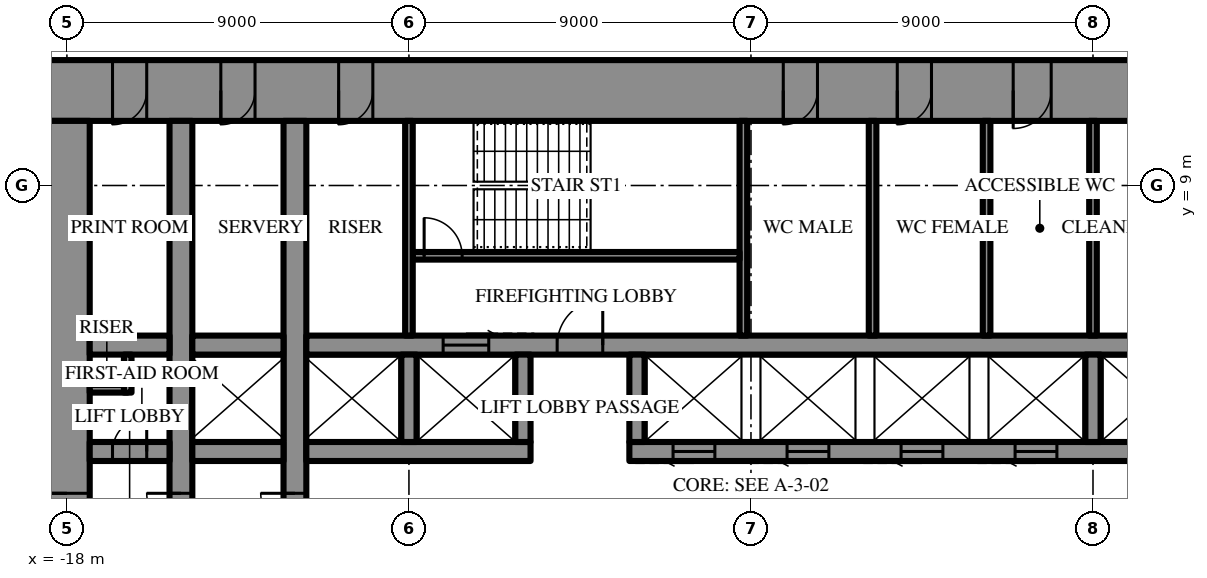
"""IFC4 building model, lengths in metres.
Left out: names, types, materials, properties, quantities, classifications, styles, units other than length and angle.
Written with IfcOpenShell. Run it as: python <this file> out.ifc"""

import sys

from ifc_helpers import new_model, si_unit, direction, frame, frame_2d, origin, place, context, subcontext, project, spatial, rectangle, extrude, element, fill, save


model = new_model("IFC4")
c1 = context("Model", 3, precision=1e-05, world=origin(), true_north=direction((0.0, 1.0)))
c2 = subcontext(c1, "Body", "Model", "MODEL_VIEW")
j1 = project(units=[si_unit("LENGTHUNIT", "METRE"), si_unit("PLANEANGLEUNIT", "RADIAN")], contexts=[c1])
p1 = place(None, origin())
s1 = spatial("IfcSite", under=j1, at=p1, CompositionType="ELEMENT")
p2 = place(p1, origin())
s2 = spatial("IfcBuilding", under=s1, at=p2, CompositionType="ELEMENT")
p3 = place(p2, frame((0.0, 0.0, 148.9)))
s3 = spatial("IfcBuildingStorey", under=s2, at=p3, CompositionType="ELEMENT", Elevation=148.9)
p4 = place(p3, frame((-18.6, 11.5, 0.0), z_axis=(0.0, 0.0, 1.0), x_axis=(1.0, 0.0, 0.0)))
e1 = element("IfcWall", 1, at=p4, inside=s3, PredefinedType="SHEAR", context=c2, shape_type="SweptSolid", body=[
    extrude(rectangle(XDim=37.2, YDim=1.6, at=frame_2d((18.6, 0.0))), origin(), (0.0, 0.0, 1.0), 4.2),
])
p5 = place(p4, frame((19.45, 0.0, 0.0)))
e2 = element("IfcOpeningElement", 2, at=p5, cuts=e1, PredefinedType="OPENING", context=c2, shape_type="SweptSolid", body=[
    extrude(rectangle(XDim=0.9, YDim=2.2, at=frame_2d((0.45, 1.1))), frame((0.0, 0.81, 0.0), z_axis=(0.0, -1.0, 0.0), x_axis=(1.0, 0.0, 0.0)), (0.0, 0.0, 1.0), 1.62),
])
p6 = place(p4, frame((22.45, 0.0, 0.0)))
e3 = element("IfcOpeningElement", 3, at=p6, cuts=e1, PredefinedType="OPENING", context=c2, shape_type="SweptSolid", body=[
    extrude(rectangle(XDim=0.9, YDim=2.2, at=frame_2d((0.45, 1.1))), frame((0.0, 0.81, 0.0), z_axis=(0.0, -1.0, 0.0), x_axis=(1.0, 0.0, 0.0)), (0.0, 0.0, 1.0), 1.62),
])
p7 = place(p4, frame((25.5, 0.0, 0.0)))
e4 = element("IfcOpeningElement", 4, at=p7, cuts=e1, PredefinedType="OPENING", context=c2, shape_type="SweptSolid", body=[
    extrude(rectangle(XDim=1.0, YDim=2.2, at=frame_2d((0.5, 1.1))), frame((0.0, 0.81, 0.0), z_axis=(0.0, -1.0, 0.0), x_axis=(1.0, 0.0, 0.0)), (0.0, 0.0, 1.0), 1.62),
])
p8 = place(p4, frame((1.8, 0.0, 0.0)))
e5 = element("IfcOpeningElement", 5, at=p8, cuts=e1, PredefinedType="OPENING", context=c2, shape_type="SweptSolid", body=[
    extrude(rectangle(XDim=0.9, YDim=2.2, at=frame_2d((0.45, 1.1))), frame((0.0, 0.81, 0.0), z_axis=(0.0, -1.0, 0.0), x_axis=(1.0, 0.0, 0.0)), (0.0, 0.0, 1.0), 1.62),
])
p9 = place(p4, frame((4.65, 0.0, 0.0)))
e6 = element("IfcOpeningElement", 6, at=p9, cuts=e1, PredefinedType="OPENING", context=c2, shape_type="SweptSolid", body=[
    extrude(rectangle(XDim=0.9, YDim=2.2, at=frame_2d((0.45, 1.1))), frame((0.0, 0.81, 0.0), z_axis=(0.0, -1.0, 0.0), x_axis=(1.0, 0.0, 0.0)), (0.0, 0.0, 1.0), 1.62),
])
p10 = place(p4, frame((7.75, 0.0, 0.0)))
e7 = element("IfcOpeningElement", 7, at=p10, cuts=e1, PredefinedType="OPENING", context=c2, shape_type="SweptSolid", body=[
    extrude(rectangle(XDim=0.9, YDim=2.2, at=frame_2d((0.45, 1.1))), frame((0.0, 0.81, 0.0), z_axis=(0.0, -1.0, 0.0), x_axis=(1.0, 0.0, 0.0)), (0.0, 0.0, 1.0), 1.62),
])
p11 = place(p4, frame((28.55, 0.0, 0.0)))
e8 = element("IfcOpeningElement", 8, at=p11, cuts=e1, PredefinedType="OPENING", context=c2, shape_type="SweptSolid", body=[
    extrude(rectangle(XDim=0.9, YDim=2.2, at=frame_2d((0.45, 1.1))), frame((0.0, 0.81, 0.0), z_axis=(0.0, -1.0, 0.0), x_axis=(1.0, 0.0, 0.0)), (0.0, 0.0, 1.0), 1.62),
])
p12 = place(p4, frame((31.65, 0.0, 0.0)))
e9 = element("IfcOpeningElement", 9, at=p12, cuts=e1, PredefinedType="OPENING", context=c2, shape_type="SweptSolid", body=[
    extrude(rectangle(XDim=0.9, YDim=2.2, at=frame_2d((0.45, 1.1))), frame((0.0, 0.81, 0.0), z_axis=(0.0, -1.0, 0.0), x_axis=(1.0, 0.0, 0.0)), (0.0, 0.0, 1.0), 1.62),
])
p13 = place(p4, frame((34.5, 0.0, 0.0)))
e10 = element("IfcOpeningElement", 10, at=p13, cuts=e1, PredefinedType="OPENING", context=c2, shape_type="SweptSolid", body=[
    extrude(rectangle(XDim=0.9, YDim=2.2, at=frame_2d((0.45, 1.1))), frame((0.0, 0.81, 0.0), z_axis=(0.0, -1.0, 0.0), x_axis=(1.0, 0.0, 0.0)), (0.0, 0.0, 1.0), 1.62),
])
p14 = place(p3, frame((-18.0, 10.7, 0.0), z_axis=(0.0, 0.0, 1.0), x_axis=(0.0, -1.0, 0.0)))
e11 = element("IfcWall", 11, at=p14, inside=s3, PredefinedType="SHEAR", context=c2, shape_type="SweptSolid", body=[
    extrude(rectangle(XDim=21.4, YDim=1.2, at=frame_2d((10.7, 0.0))), origin(), (0.0, 0.0, 1.0), 4.2),
])
p15 = place(p14, frame((9.8, 0.0, 0.0)))
e12 = element("IfcOpeningElement", 12, at=p15, cuts=e11, PredefinedType="OPENING", context=c2, shape_type="SweptSolid", body=[
    extrude(rectangle(XDim=1.8, YDim=2.4, at=frame_2d((0.9, 1.2))), frame((0.0, 0.61, 0.0), z_axis=(0.0, -1.0, 0.0), x_axis=(1.0, 0.0, 0.0)), (0.0, 0.0, 1.0), 1.22),
])
p16 = place(p3, frame((-12.0, -10.7, 0.0), z_axis=(0.0, 0.0, 1.0), x_axis=(0.0, 1.0, 0.0)))
e13 = element("IfcWall", 13, at=p16, inside=s3, PredefinedType="SHEAR", context=c2, shape_type="SweptSolid", body=[
    extrude(rectangle(XDim=21.4, YDim=0.6, at=frame_2d((10.7, 0.0))), origin(), (0.0, 0.0, 1.0), 4.2),
])
p17 = place(p16, frame((9.8, 0.0, 0.0)))
e14 = element("IfcOpeningElement", 14, at=p17, cuts=e13, PredefinedType="OPENING", context=c2, shape_type="SweptSolid", body=[
    extrude(rectangle(XDim=1.8, YDim=2.4, at=frame_2d((0.9, 1.2))), frame((0.0, 0.31, 0.0), z_axis=(0.0, -1.0, 0.0), x_axis=(1.0, 0.0, 0.0)), (0.0, 0.0, 1.0), 0.62),
])
p18 = place(p3, frame((-15.0, -10.7, 0.0), z_axis=(0.0, 0.0, 1.0), x_axis=(0.0, 1.0, 0.0)))
e15 = element("IfcWall", 15, at=p18, inside=s3, PredefinedType="SHEAR", context=c2, shape_type="SweptSolid", body=[
    extrude(rectangle(XDim=21.4, YDim=0.6, at=frame_2d((10.7, 0.0))), origin(), (0.0, 0.0, 1.0), 4.2),
])
p19 = place(p18, frame((9.8, 0.0, 0.0)))
e16 = element("IfcOpeningElement", 16, at=p19, cuts=e15, PredefinedType="OPENING", context=c2, shape_type="SweptSolid", body=[
    extrude(rectangle(XDim=1.8, YDim=2.4, at=frame_2d((0.9, 1.2))), frame((0.0, 0.31, 0.0), z_axis=(0.0, -1.0, 0.0), x_axis=(1.0, 0.0, 0.0)), (0.0, 0.0, 1.0), 0.62),
])
p20 = place(p3, frame((-17.4, 2.0, 0.0), z_axis=(0.0, 0.0, 1.0), x_axis=(1.0, 0.0, 0.0)))
e17 = element("IfcWall", 17, at=p20, inside=s3, PredefinedType="SHEAR", context=c2, shape_type="SweptSolid", body=[
    extrude(rectangle(XDim=2.1, YDim=0.5, at=frame_2d((1.05, 0.0))), origin(), (0.0, 0.0, 1.0), 4.2),
])
p21 = place(p20, frame((0.6, 0.0, 0.0)))
e18 = element("IfcOpeningElement", 18, at=p21, cuts=e17, PredefinedType="OPENING", context=c2, shape_type="SweptSolid", body=[
    extrude(rectangle(XDim=0.9, YDim=2.2, at=frame_2d((0.45, 1.1))), frame((0.0, 0.26, 0.0), z_axis=(0.0, -1.0, 0.0), x_axis=(1.0, 0.0, 0.0)), (0.0, 0.0, 1.0), 0.52),
])
p22 = place(p3, frame((-14.7, 2.0, 0.0), z_axis=(0.0, 0.0, 1.0), x_axis=(1.0, 0.0, 0.0)))
e19 = element("IfcWall", 19, at=p22, inside=s3, PredefinedType="SHEAR", context=c2, shape_type="SweptSolid", body=[
    extrude(rectangle(XDim=2.4, YDim=0.5, at=frame_2d((1.2, 0.0))), origin(), (0.0, 0.0, 1.0), 4.2),
])
p23 = place(p3, frame((-11.7, 2.0, 0.0), z_axis=(0.0, 0.0, 1.0), x_axis=(1.0, 0.0, 0.0)))
e20 = element("IfcWall", 20, at=p23, inside=s3, PredefinedType="SHEAR", context=c2, shape_type="SweptSolid", body=[
    extrude(rectangle(XDim=5.9, YDim=0.5, at=frame_2d((2.95, 0.0))), origin(), (0.0, 0.0, 1.0), 4.2),
])
p24 = place(p3, frame((-3.2, 2.0, 0.0), z_axis=(0.0, 0.0, 1.0), x_axis=(1.0, 0.0, 0.0)))
e21 = element("IfcWall", 21, at=p24, inside=s3, PredefinedType="SHEAR", context=c2, shape_type="SweptSolid", body=[
    extrude(rectangle(XDim=14.9, YDim=0.5, at=frame_2d((7.45, 0.0))), origin(), (0.0, 0.0, 1.0), 4.2),
])
p25 = place(p24, frame((1.15, 0.0, 0.0)))
e22 = element("IfcOpeningElement", 22, at=p25, cuts=e21, PredefinedType="OPENING", context=c2, shape_type="SweptSolid", body=[
    extrude(rectangle(XDim=1.1, YDim=2.2, at=frame_2d((0.55, 1.1))), frame((0.0, 0.26, 0.0), z_axis=(0.0, -1.0, 0.0), x_axis=(1.0, 0.0, 0.0)), (0.0, 0.0, 1.0), 0.52),
])
p26 = place(p24, frame((4.15, 0.0, 0.0)))
e23 = element("IfcOpeningElement", 23, at=p26, cuts=e21, PredefinedType="OPENING", context=c2, shape_type="SweptSolid", body=[
    extrude(rectangle(XDim=1.1, YDim=2.2, at=frame_2d((0.55, 1.1))), frame((0.0, 0.26, 0.0), z_axis=(0.0, -1.0, 0.0), x_axis=(1.0, 0.0, 0.0)), (0.0, 0.0, 1.0), 0.52),
])
p27 = place(p24, frame((7.15, 0.0, 0.0)))
e24 = element("IfcOpeningElement", 24, at=p27, cuts=e21, PredefinedType="OPENING", context=c2, shape_type="SweptSolid", body=[
    extrude(rectangle(XDim=1.1, YDim=2.2, at=frame_2d((0.55, 1.1))), frame((0.0, 0.26, 0.0), z_axis=(0.0, -1.0, 0.0), x_axis=(1.0, 0.0, 0.0)), (0.0, 0.0, 1.0), 0.52),
])
p28 = place(p24, frame((10.15, 0.0, 0.0)))
e25 = element("IfcOpeningElement", 25, at=p28, cuts=e21, PredefinedType="OPENING", context=c2, shape_type="SweptSolid", body=[
    extrude(rectangle(XDim=1.1, YDim=2.2, at=frame_2d((0.55, 1.1))), frame((0.0, 0.26, 0.0), z_axis=(0.0, -1.0, 0.0), x_axis=(1.0, 0.0, 0.0)), (0.0, 0.0, 1.0), 0.52),
])
p29 = place(p3, frame((-17.4, 4.8, 0.0), z_axis=(0.0, 0.0, 1.0), x_axis=(1.0, 0.0, 0.0)))
e26 = element("IfcWall", 26, at=p29, inside=s3, PredefinedType="SHEAR", context=c2, shape_type="SweptSolid", body=[
    extrude(rectangle(XDim=2.1, YDim=0.5, at=frame_2d((1.05, 0.0))), origin(), (0.0, 0.0, 1.0), 4.2),
])
p30 = place(p3, frame((-14.7, 4.8, 0.0), z_axis=(0.0, 0.0, 1.0), x_axis=(1.0, 0.0, 0.0)))
e27 = element("IfcWall", 27, at=p30, inside=s3, PredefinedType="SHEAR", context=c2, shape_type="SweptSolid", body=[
    extrude(rectangle(XDim=2.4, YDim=0.5, at=frame_2d((1.2, 0.0))), origin(), (0.0, 0.0, 1.0), 4.2),
])
p31 = place(p3, frame((-11.7, 4.8, 0.0), z_axis=(0.0, 0.0, 1.0), x_axis=(1.0, 0.0, 0.0)))
e28 = element("IfcWall", 28, at=p31, inside=s3, PredefinedType="SHEAR", context=c2, shape_type="SweptSolid", body=[
    extrude(rectangle(XDim=23.4, YDim=0.5, at=frame_2d((11.7, 0.0))), origin(), (0.0, 0.0, 1.0), 4.2),
])
p32 = place(p31, frame((6.6, 0.0, 0.0)))
e29 = element("IfcOpeningElement", 29, at=p32, cuts=e28, PredefinedType="OPENING", context=c2, shape_type="SweptSolid", body=[
    extrude(rectangle(XDim=1.2, YDim=2.2, at=frame_2d((0.6, 1.1))), frame((0.0, 0.26, 0.0), z_axis=(0.0, -1.0, 0.0), x_axis=(1.0, 0.0, 0.0)), (0.0, 0.0, 1.0), 0.52),
])
p33 = place(p31, frame((3.6, 0.0, 0.0)))
e30 = element("IfcOpeningElement", 30, at=p33, cuts=e28, PredefinedType="OPENING", context=c2, shape_type="SweptSolid", body=[
    extrude(rectangle(XDim=1.2, YDim=2.2, at=frame_2d((0.6, 1.1))), frame((0.0, 0.26, 0.0), z_axis=(0.0, -1.0, 0.0), x_axis=(1.0, 0.0, 0.0)), (0.0, 0.0, 1.0), 0.52),
])
for number, where, z_axis, x_axis in (
    (31, (-9.0, 2.25, 0.0), (0.0, 0.0, 1.0), (0.0, 1.0, 0.0)),
    (32, (-6.0, 2.25, 0.0), (0.0, 0.0, 1.0), (0.0, 1.0, 0.0)),
    (33, (-3.0, 2.25, 0.0), (0.0, 0.0, 1.0), (0.0, 1.0, 0.0)),
    (34, (9.0, 2.25, 0.0), (0.0, 0.0, 1.0), (0.0, 1.0, 0.0)),
):
    element("IfcWall", number, at=place(p3, frame(where, z_axis=z_axis, x_axis=x_axis)), inside=s3, PredefinedType="SHEAR", context=c2, shape_type="SweptSolid", body=[
        extrude(rectangle(XDim=2.3, YDim=0.4, at=frame_2d((1.15, 0.0))), origin(), (0.0, 0.0, 1.0), 4.2),
    ])
p34 = place(p3, frame((-0.2, 5.05, 0.0), z_axis=(0.0, 0.0, 1.0), x_axis=(0.0, 1.0, 0.0)))
e35 = element("IfcWall", 35, at=p34, inside=s3, PredefinedType="SHEAR", context=c2, shape_type="SweptSolid", body=[
    extrude(rectangle(XDim=5.65, YDim=0.2, at=frame_2d((2.825, 0.0))), origin(), (0.0, 0.0, 1.0), 4.2),
])
p35 = place(p3, frame((-8.9, 7.15, 0.0), z_axis=(0.0, 0.0, 1.0), x_axis=(1.0, 0.0, 0.0)))
e36 = element("IfcWall", 36, at=p35, inside=s3, PredefinedType="SHEAR", context=c2, shape_type="SweptSolid", body=[
    extrude(rectangle(XDim=8.6, YDim=0.2, at=frame_2d((4.3, 0.0))), origin(), (0.0, 0.0, 1.0), 4.2),
])
p36 = place(p35, frame((0.3, 0.0, 0.0)))
e37 = element("IfcOpeningElement", 37, at=p36, cuts=e36, PredefinedType="OPENING", context=c2, shape_type="SweptSolid", body=[
    extrude(rectangle(XDim=1.0, YDim=2.2, at=frame_2d((0.5, 1.1))), frame((0.0, 0.11, 0.0), z_axis=(0.0, -1.0, 0.0), x_axis=(1.0, 0.0, 0.0)), (0.0, 0.0, 1.0), 0.22),
])
for number, where, z_axis, x_axis in (
    (38, (-9.0, 5.05, 0.0), (0.0, 0.0, 1.0), (0.0, 1.0, 0.0)),
    (39, (9.0, 5.05, 0.0), (0.0, 0.0, 1.0), (0.0, 1.0, 0.0)),
    (40, (3.2, 5.05, 0.0), (0.0, 0.0, 1.0), (0.0, 1.0, 0.0)),
    (41, (6.2, 5.05, 0.0), (0.0, 0.0, 1.0), (0.0, 1.0, 0.0)),
):
    element("IfcWall", number, at=place(p3, frame(where, z_axis=z_axis, x_axis=x_axis)), inside=s3, PredefinedType="PARTITIONING", context=c2, shape_type="SweptSolid", body=[
        extrude(rectangle(XDim=5.65, YDim=0.2, at=frame_2d((2.825, 0.0))), origin(), (0.0, 0.0, 1.0), 4.0),
    ])
for number, where, z_axis, x_axis in (
    (42, (-17.4, 3.65, 0.0), (0.0, 0.0, 1.0), (1.0, 0.0, 0.0)),
    (43, (-16.4, 3.55, 0.0), (0.0, 0.0, 1.0), (0.0, 1.0, 0.0)),
):
    element("IfcWall", number, at=place(p3, frame(where, z_axis=z_axis, x_axis=x_axis)), inside=s3, PredefinedType="PARTITIONING", context=c2, shape_type="SweptSolid", body=[
        extrude(rectangle(XDim=1.0, YDim=0.2, at=frame_2d((0.5, 0.0))), origin(), (0.0, 0.0, 1.0), 4.0),
    ])
p37 = place(p15, frame((1.8, 0.0, 0.0), z_axis=(0.0, 0.0, 1.0), x_axis=(-1.0, 0.0, 0.0)))
e44 = element("IfcDoor", 44, at=p37, inside=s3, OperationType="DOUBLE_DOOR_SINGLE_SWING", PredefinedType="DOOR", context=c2, shape_type="SweptSolid", body=[
    extrude(rectangle(XDim=1.8, YDim=2.4, at=frame_2d((0.9, 1.2))), frame((0.0, 0.025, 0.0), z_axis=(0.0, -1.0, 0.0), x_axis=(1.0, 0.0, 0.0)), (0.0, 0.0, 1.0), 0.05),
])
fill(e12, e44)
p38 = place(p32, origin())
e45 = element("IfcDoor", 45, at=p38, inside=s3, OperationType="SINGLE_SWING_LEFT", PredefinedType="DOOR", context=c2, shape_type="SweptSolid", body=[
    extrude(rectangle(XDim=1.2, YDim=2.2, at=frame_2d((0.6, 1.1))), frame((0.0, 0.025, 0.0), z_axis=(0.0, -1.0, 0.0), x_axis=(1.0, 0.0, 0.0)), (0.0, 0.0, 1.0), 0.05),
])
fill(e29, e45)
p39 = place(p36, origin())
e46 = element("IfcDoor", 46, at=p39, inside=s3, OperationType="SINGLE_SWING_RIGHT", PredefinedType="DOOR", context=c2, shape_type="SweptSolid", body=[
    extrude(rectangle(XDim=1.0, YDim=2.2, at=frame_2d((0.5, 1.1))), frame((0.0, 0.025, 0.0), z_axis=(0.0, -1.0, 0.0), x_axis=(1.0, 0.0, 0.0)), (0.0, 0.0, 1.0), 0.05),
])
fill(e37, e46)
p40 = place(p5, frame((0.9, 0.0, 0.0), z_axis=(0.0, 0.0, 1.0), x_axis=(-1.0, 0.0, 0.0)))
e47 = element("IfcDoor", 47, at=p40, inside=s3, OperationType="SINGLE_SWING_LEFT", PredefinedType="DOOR", context=c2, shape_type="SweptSolid", body=[
    extrude(rectangle(XDim=0.9, YDim=2.2, at=frame_2d((0.45, 1.1))), frame((0.0, 0.025, 0.0), z_axis=(0.0, -1.0, 0.0), x_axis=(1.0, 0.0, 0.0)), (0.0, 0.0, 1.0), 0.05),
])
fill(e2, e47)
p41 = place(p6, frame((0.9, 0.0, 0.0), z_axis=(0.0, 0.0, 1.0), x_axis=(-1.0, 0.0, 0.0)))
e48 = element("IfcDoor", 48, at=p41, inside=s3, OperationType="SINGLE_SWING_LEFT", PredefinedType="DOOR", context=c2, shape_type="SweptSolid", body=[
    extrude(rectangle(XDim=0.9, YDim=2.2, at=frame_2d((0.45, 1.1))), frame((0.0, 0.025, 0.0), z_axis=(0.0, -1.0, 0.0), x_axis=(1.0, 0.0, 0.0)), (0.0, 0.0, 1.0), 0.05),
])
fill(e3, e48)
p42 = place(p7, frame((1.0, 0.0, 0.0), z_axis=(0.0, 0.0, 1.0), x_axis=(-1.0, 0.0, 0.0)))
e49 = element("IfcDoor", 49, at=p42, inside=s3, OperationType="SINGLE_SWING_LEFT", PredefinedType="DOOR", context=c2, shape_type="SweptSolid", body=[
    extrude(rectangle(XDim=1.0, YDim=2.2, at=frame_2d((0.5, 1.1))), frame((0.0, 0.025, 0.0), z_axis=(0.0, -1.0, 0.0), x_axis=(1.0, 0.0, 0.0)), (0.0, 0.0, 1.0), 0.05),
])
fill(e4, e49)
p43 = place(p8, frame((0.9, 0.0, 0.0), z_axis=(0.0, 0.0, 1.0), x_axis=(-1.0, 0.0, 0.0)))
e50 = element("IfcDoor", 50, at=p43, inside=s3, OperationType="SINGLE_SWING_LEFT", PredefinedType="DOOR", context=c2, shape_type="SweptSolid", body=[
    extrude(rectangle(XDim=0.9, YDim=2.2, at=frame_2d((0.45, 1.1))), frame((0.0, 0.025, 0.0), z_axis=(0.0, -1.0, 0.0), x_axis=(1.0, 0.0, 0.0)), (0.0, 0.0, 1.0), 0.05),
])
fill(e5, e50)
p44 = place(p9, frame((0.9, 0.0, 0.0), z_axis=(0.0, 0.0, 1.0), x_axis=(-1.0, 0.0, 0.0)))
e51 = element("IfcDoor", 51, at=p44, inside=s3, OperationType="SINGLE_SWING_LEFT", PredefinedType="DOOR", context=c2, shape_type="SweptSolid", body=[
    extrude(rectangle(XDim=0.9, YDim=2.2, at=frame_2d((0.45, 1.1))), frame((0.0, 0.025, 0.0), z_axis=(0.0, -1.0, 0.0), x_axis=(1.0, 0.0, 0.0)), (0.0, 0.0, 1.0), 0.05),
])
fill(e6, e51)
p45 = place(p10, frame((0.9, 0.0, 0.0), z_axis=(0.0, 0.0, 1.0), x_axis=(-1.0, 0.0, 0.0)))
e52 = element("IfcDoor", 52, at=p45, inside=s3, OperationType="SINGLE_SWING_LEFT", PredefinedType="DOOR", context=c2, shape_type="SweptSolid", body=[
    extrude(rectangle(XDim=0.9, YDim=2.2, at=frame_2d((0.45, 1.1))), frame((0.0, 0.025, 0.0), z_axis=(0.0, -1.0, 0.0), x_axis=(1.0, 0.0, 0.0)), (0.0, 0.0, 1.0), 0.05),
])
fill(e7, e52)
p46 = place(p21, origin())
e53 = element("IfcDoor", 53, at=p46, inside=s3, OperationType="SINGLE_SWING_LEFT", PredefinedType="DOOR", context=c2, shape_type="SweptSolid", body=[
    extrude(rectangle(XDim=0.9, YDim=2.2, at=frame_2d((0.45, 1.1))), frame((0.0, 0.025, 0.0), z_axis=(0.0, -1.0, 0.0), x_axis=(1.0, 0.0, 0.0)), (0.0, 0.0, 1.0), 0.05),
])
fill(e18, e53)
p47 = place(p17, origin())
e54 = element("IfcDoor", 54, at=p47, inside=s3, OperationType="DOUBLE_DOOR_SINGLE_SWING", PredefinedType="DOOR", context=c2, shape_type="SweptSolid", body=[
    extrude(rectangle(XDim=1.8, YDim=2.4, at=frame_2d((0.9, 1.2))), frame((0.0, 0.025, 0.0), z_axis=(0.0, -1.0, 0.0), x_axis=(1.0, 0.0, 0.0)), (0.0, 0.0, 1.0), 0.05),
])
fill(e14, e54)
p48 = place(p19, origin())
e55 = element("IfcDoor", 55, at=p48, inside=s3, OperationType="DOUBLE_DOOR_SINGLE_SWING", PredefinedType="DOOR", context=c2, shape_type="SweptSolid", body=[
    extrude(rectangle(XDim=1.8, YDim=2.4, at=frame_2d((0.9, 1.2))), frame((0.0, 0.025, 0.0), z_axis=(0.0, -1.0, 0.0), x_axis=(1.0, 0.0, 0.0)), (0.0, 0.0, 1.0), 0.05),
])
fill(e16, e55)
p49 = place(p33, origin())
e56 = element("IfcDoor", 56, at=p49, inside=s3, OperationType="SLIDING_TO_LEFT", PredefinedType="DOOR", context=c2, shape_type="SweptSolid", body=[
    extrude(rectangle(XDim=1.2, YDim=2.2, at=frame_2d((0.6, 1.1))), frame((0.0, 0.025, 0.0), z_axis=(0.0, -1.0, 0.0), x_axis=(1.0, 0.0, 0.0)), (0.0, 0.0, 1.0), 0.05),
])
fill(e30, e56)
p50 = place(p25, frame((1.1, 0.0, 0.0), z_axis=(0.0, 0.0, 1.0), x_axis=(-1.0, 0.0, 0.0)))
e57 = element("IfcDoor", 57, at=p50, inside=s3, OperationType="SLIDING_TO_LEFT", PredefinedType="DOOR", context=c2, shape_type="SweptSolid", body=[
    extrude(rectangle(XDim=1.1, YDim=2.2, at=frame_2d((0.55, 1.1))), frame((0.0, 0.025, 0.0), z_axis=(0.0, -1.0, 0.0), x_axis=(1.0, 0.0, 0.0)), (0.0, 0.0, 1.0), 0.05),
])
fill(e22, e57)
p51 = place(p26, frame((1.1, 0.0, 0.0), z_axis=(0.0, 0.0, 1.0), x_axis=(-1.0, 0.0, 0.0)))
e58 = element("IfcDoor", 58, at=p51, inside=s3, OperationType="SLIDING_TO_LEFT", PredefinedType="DOOR", context=c2, shape_type="SweptSolid", body=[
    extrude(rectangle(XDim=1.1, YDim=2.2, at=frame_2d((0.55, 1.1))), frame((0.0, 0.025, 0.0), z_axis=(0.0, -1.0, 0.0), x_axis=(1.0, 0.0, 0.0)), (0.0, 0.0, 1.0), 0.05),
])
fill(e23, e58)
p52 = place(p27, frame((1.1, 0.0, 0.0), z_axis=(0.0, 0.0, 1.0), x_axis=(-1.0, 0.0, 0.0)))
e59 = element("IfcDoor", 59, at=p52, inside=s3, OperationType="SLIDING_TO_LEFT", PredefinedType="DOOR", context=c2, shape_type="SweptSolid", body=[
    extrude(rectangle(XDim=1.1, YDim=2.2, at=frame_2d((0.55, 1.1))), frame((0.0, 0.025, 0.0), z_axis=(0.0, -1.0, 0.0), x_axis=(1.0, 0.0, 0.0)), (0.0, 0.0, 1.0), 0.05),
])
fill(e24, e59)
p53 = place(p28, frame((1.1, 0.0, 0.0), z_axis=(0.0, 0.0, 1.0), x_axis=(-1.0, 0.0, 0.0)))
e60 = element("IfcDoor", 60, at=p53, inside=s3, OperationType="SLIDING_TO_LEFT", PredefinedType="DOOR", context=c2, shape_type="SweptSolid", body=[
    extrude(rectangle(XDim=1.1, YDim=2.2, at=frame_2d((0.55, 1.1))), frame((0.0, 0.025, 0.0), z_axis=(0.0, -1.0, 0.0), x_axis=(1.0, 0.0, 0.0)), (0.0, 0.0, 1.0), 0.05),
])
fill(e25, e60)
save(model, sys.argv[1])
